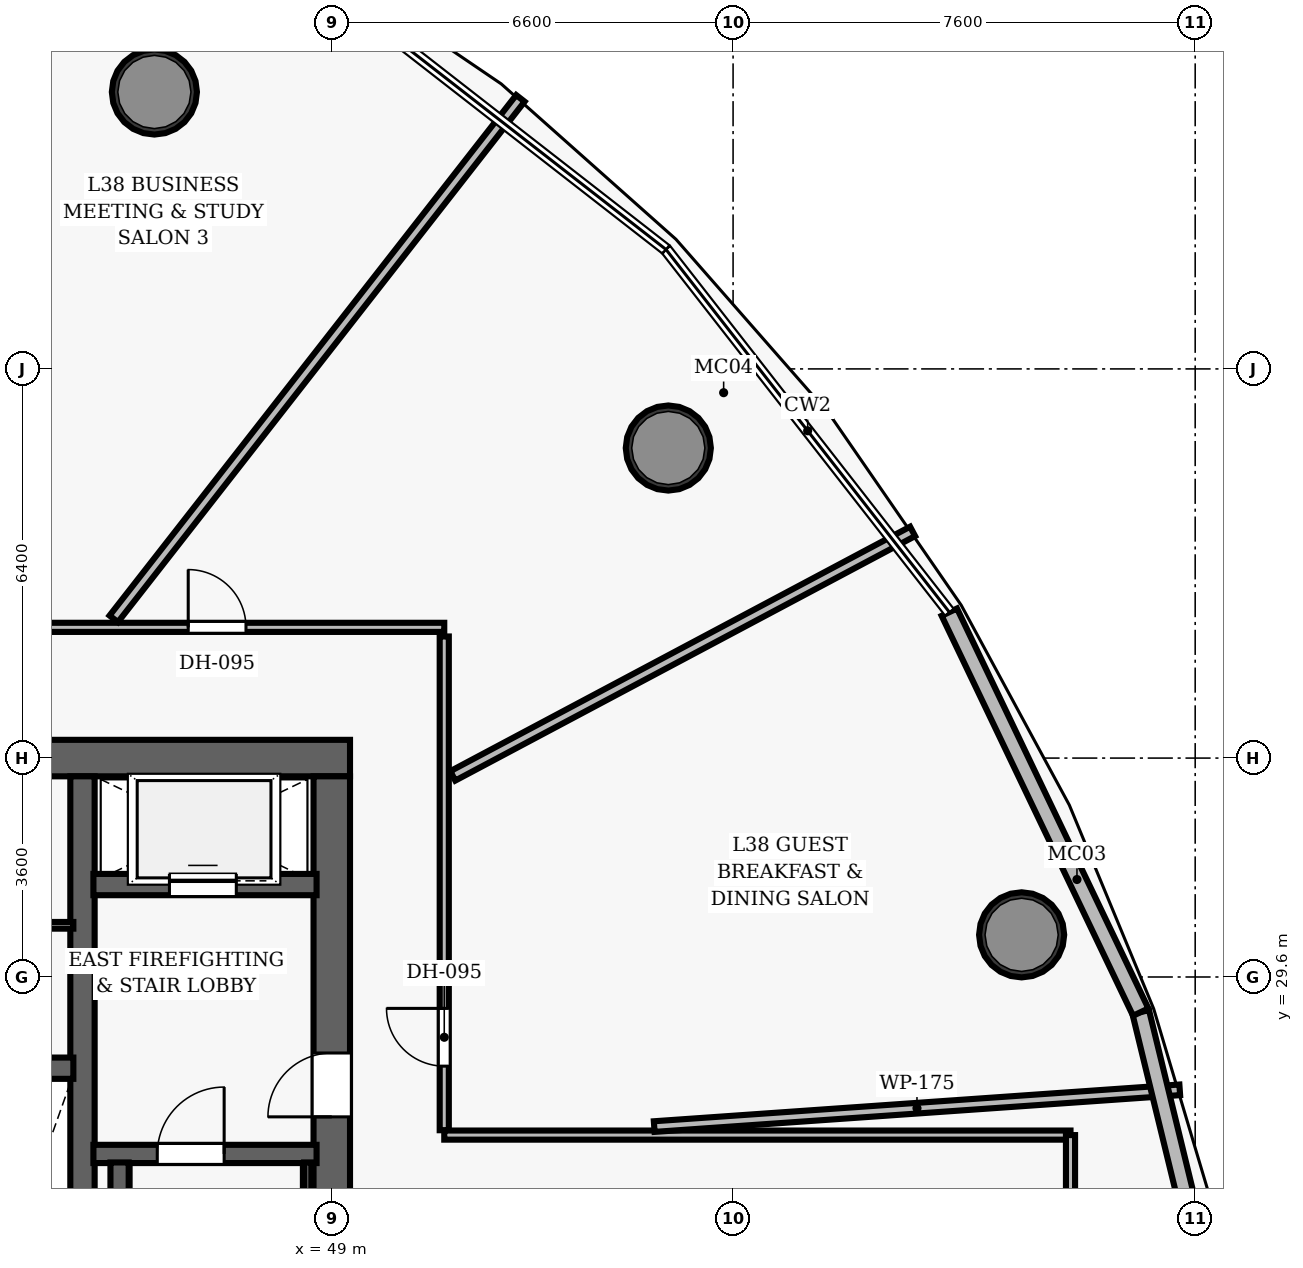
"""IFC4 building model, lengths in metres.
Left out: names, types, materials, properties, quantities, classifications, styles, units other than length and angle.
Written with IfcOpenShell. Run it as: python <this file> out.ifc"""

import sys

from ifc_helpers import new_model, si_unit, direction, frame, frame_2d, origin, origin_2d, place, context, subcontext, project, spatial, rectangle, hollow_circle, extrude, element, fill, save


model = new_model("IFC4")
c1 = context("Model", 3, precision=1e-05, world=origin(), true_north=direction((0.0, 1.0)))
c2 = subcontext(c1, "Body", "Model", "MODEL_VIEW")
j1 = project(units=[si_unit("LENGTHUNIT", "METRE"), si_unit("PLANEANGLEUNIT", "RADIAN")], contexts=[c1])
p1 = place(None, origin())
s1 = spatial("IfcSite", under=j1, at=p1, CompositionType="ELEMENT")
p2 = place(p1, origin())
s2 = spatial("IfcBuilding", under=s1, at=p2, CompositionType="ELEMENT")
p3 = place(p2, frame((0.0, 0.0, 151.8)))
s3 = spatial("IfcBuildingStorey", under=s2, at=p3, CompositionType="ELEMENT", Elevation=151.8)
p4 = place(p3, frame((26.7, 33.2, 0.0), z_axis=(0.0, 0.0, 1.0), x_axis=(1.0, 0.0, 0.0)))
e1 = element("IfcWall", 1, at=p4, inside=s3, PredefinedType="SHEAR", context=c2, shape_type="SweptSolid", body=[
    extrude(rectangle(XDim=22.6, YDim=0.6, at=frame_2d((11.3, 0.0))), origin(), (0.0, 0.0, 1.0), 3.5),
])
p5 = place(p4, frame((4.62, 0.0, 0.0)))
e2 = element("IfcOpeningElement", 2, at=p5, cuts=e1, PredefinedType="OPENING", context=c2, shape_type="SweptSolid", body=[
    extrude(rectangle(XDim=1.05, YDim=2.15, at=frame_2d((0.525, 1.075))), frame((0.0, 0.31, 0.0), z_axis=(0.0, -1.0, 0.0), x_axis=(1.0, 0.0, 0.0)), (0.0, 0.0, 1.0), 0.62),
])
p6 = place(p4, frame((14.52, 0.0, 0.0)))
e3 = element("IfcOpeningElement", 3, at=p6, cuts=e1, PredefinedType="OPENING", context=c2, shape_type="SweptSolid", body=[
    extrude(rectangle(XDim=1.05, YDim=2.15, at=frame_2d((0.525, 1.075))), frame((0.0, 0.31, 0.0), z_axis=(0.0, -1.0, 0.0), x_axis=(1.0, 0.0, 0.0)), (0.0, 0.0, 1.0), 0.62),
])
p7 = place(p3, frame((49.0, 19.1, 0.0), z_axis=(0.0, 0.0, 1.0), x_axis=(0.0, 1.0, 0.0)))
e4 = element("IfcWall", 4, at=p7, inside=s3, PredefinedType="SHEAR", context=c2, shape_type="SweptSolid", body=[
    extrude(rectangle(XDim=13.8, YDim=0.6, at=frame_2d((6.9, 0.0))), origin(), (0.0, 0.0, 1.0), 3.5),
])
p8 = place(p7, frame((8.2, 0.0, 0.0)))
e5 = element("IfcOpeningElement", 5, at=p8, cuts=e4, PredefinedType="OPENING", context=c2, shape_type="SweptSolid", body=[
    extrude(rectangle(XDim=1.05, YDim=2.15, at=frame_2d((0.525, 1.075))), frame((0.0, 0.31, 0.0), z_axis=(0.0, -1.0, 0.0), x_axis=(1.0, 0.0, 0.0)), (0.0, 0.0, 1.0), 0.62),
])
p9 = place(p3, frame((44.9, 19.1, 0.0), z_axis=(0.0, 0.0, 1.0), x_axis=(0.0, 1.0, 0.0)))
e6 = element("IfcWall", 6, at=p9, inside=s3, PredefinedType="SHEAR", context=c2, shape_type="SweptSolid", body=[
    extrude(rectangle(XDim=13.8, YDim=0.4, at=frame_2d((6.9, 0.0))), origin(), (0.0, 0.0, 1.0), 3.5),
])
for number, where, z_axis, x_axis in (
    (7, (60.346, 30.293, 0.0), (0.0, 0.0, 1.0), (1.0, 0.0, 0.0)),
    (8, (54.535, 38.299, 0.0), (0.0, 0.0, 1.0), (1.0, 0.0, 0.0)),
    (9, (46.083, 44.154, 0.0), (0.0, 0.0, 1.0), (1.0, 0.0, 0.0)),
):
    element("IfcColumn", number, at=place(p3, frame(where, z_axis=z_axis, x_axis=x_axis)), inside=s3, PredefinedType="COLUMN", context=c2, shape_type="SweptSolid", body=[
        extrude(hollow_circle(Radius=0.7, WallThickness=0.055, at=origin_2d()), origin(), (0.0, 0.0, 1.0), 3.5),
    ])
p10 = place(p3, frame((45.08, 26.69, 0.0), z_axis=(0.0, 0.0, 1.0), x_axis=(1.0, 0.0, 0.0)))
e10 = element("IfcWall", 10, at=p10, inside=s3, PredefinedType="SHEAR", context=c2, shape_type="SweptSolid", body=[
    extrude(rectangle(XDim=3.67, YDim=0.3, at=frame_2d((1.835, 0.0))), origin(), (0.0, 0.0, 1.0), 3.5),
])
p11 = place(p10, frame((1.05, 0.0, 0.0)))
e11 = element("IfcOpeningElement", 11, at=p11, cuts=e10, PredefinedType="OPENING", context=c2, shape_type="SweptSolid", body=[
    extrude(rectangle(XDim=1.1, YDim=2.15, at=frame_2d((0.55, 1.075))), frame((0.0, 0.16, 0.0), z_axis=(0.0, -1.0, 0.0), x_axis=(1.0, 0.0, 0.0)), (0.0, 0.0, 1.0), 0.32),
])
p12 = place(p3, frame((45.51, 19.05, 0.0), z_axis=(0.0, 0.0, 1.0), x_axis=(0.0, 1.0, 0.0)))
e12 = element("IfcWall", 12, at=p12, inside=s3, PredefinedType="SHEAR", context=c2, shape_type="SweptSolid", body=[
    extrude(rectangle(XDim=7.5, YDim=0.3, at=frame_2d((3.75, 0.0))), origin(), (0.0, 0.0, 1.0), 3.5),
])
p13 = place(p3, frame((48.605, 19.1, 0.0), z_axis=(0.0, 0.0, 1.0), x_axis=(0.0, 1.0, 0.0)))
e13 = element("IfcWall", 13, at=p13, inside=s3, PredefinedType="SHEAR", context=c2, shape_type="SweptSolid", body=[
    extrude(rectangle(XDim=7.45, YDim=0.12, at=frame_2d((3.725, 0.0))), origin(), (0.0, 0.0, 1.0), 3.5),
])
p14 = place(p3, frame((45.08, 31.12, 0.0), z_axis=(0.0, 0.0, 1.0), x_axis=(1.0, 0.0, 0.0)))
e14 = element("IfcWall", 14, at=p14, inside=s3, PredefinedType="SHEAR", context=c2, shape_type="SweptSolid", body=[
    extrude(rectangle(XDim=3.67, YDim=0.35, at=frame_2d((1.835, 0.0))), origin(), (0.0, 0.0, 1.0), 2.675),
])
p15 = place(p14, frame((1.25, 0.0, 0.0)))
e15 = element("IfcOpeningElement", 15, at=p15, cuts=e14, PredefinedType="OPENING", context=c2, shape_type="SweptSolid", body=[
    extrude(rectangle(XDim=1.1, YDim=2.15, at=frame_2d((0.55, 1.075))), frame((0.0, 0.185, 0.0), z_axis=(0.0, -1.0, 0.0), x_axis=(1.0, 0.0, 0.0)), (0.0, 0.0, 1.0), 0.37),
])
p16 = place(p3, frame((42.72, 28.1, 0.0), z_axis=(0.0, 0.0, 1.0), x_axis=(1.0, 0.0, 0.0)))
e16 = element("IfcWall", 16, at=p16, inside=s3, PredefinedType="SHEAR", context=c2, shape_type="SweptSolid", body=[
    extrude(rectangle(XDim=2.03, YDim=0.35, at=frame_2d((1.015, 0.0))), origin(), (0.0, 0.0, 1.0), 2.675),
])
p17 = place(p3, frame((42.55, 30.45, 0.0), z_axis=(0.0, 0.0, 1.0), x_axis=(1.0, 0.0, 0.0)))
e17 = element("IfcWall", 17, at=p17, inside=s3, PredefinedType="PARTITIONING", context=c2, shape_type="SweptSolid", body=[
    extrude(rectangle(XDim=2.2, YDim=0.11, at=frame_2d((1.1, 0.0))), origin(), (0.0, 0.0, 1.0), 2.675),
])
p18 = place(p3, frame((24.85, 35.35, 0.0), z_axis=(0.0, 0.0, 1.0), x_axis=(1.0, 0.0, 0.0)))
e18 = element("IfcWall", 18, at=p18, inside=s3, PredefinedType="PARTITIONING", context=c2, shape_type="SweptSolid", body=[
    extrude(rectangle(XDim=26.0, YDim=0.15, at=frame_2d((13.0, 0.0))), origin(), (0.0, 0.0, 1.0), 2.675),
])
p19 = place(p18, frame((21.789, 0.0, 0.0)))
e19 = element("IfcOpeningElement", 19, at=p19, cuts=e18, PredefinedType="OPENING", context=c2, shape_type="SweptSolid", body=[
    extrude(rectangle(XDim=0.95, YDim=2.15, at=frame_2d((0.475, 1.075))), frame((0.0, 0.085, 0.0), z_axis=(0.0, -1.0, 0.0), x_axis=(1.0, 0.0, 0.0)), (0.0, 0.0, 1.0), 0.17),
])
p20 = place(p18, frame((16.151, 0.0, 0.0)))
e20 = element("IfcOpeningElement", 20, at=p20, cuts=e18, PredefinedType="OPENING", context=c2, shape_type="SweptSolid", body=[
    extrude(rectangle(XDim=0.95, YDim=2.15, at=frame_2d((0.475, 1.075))), frame((0.0, 0.085, 0.0), z_axis=(0.0, -1.0, 0.0), x_axis=(1.0, 0.0, 0.0)), (0.0, 0.0, 1.0), 0.17),
])
p21 = place(p18, frame((13.021, 0.0, 0.0)))
e21 = element("IfcOpeningElement", 21, at=p21, cuts=e18, PredefinedType="OPENING", context=c2, shape_type="SweptSolid", body=[
    extrude(rectangle(XDim=0.95, YDim=2.15, at=frame_2d((0.475, 1.075))), frame((0.0, 0.085, 0.0), z_axis=(0.0, -1.0, 0.0), x_axis=(1.0, 0.0, 0.0)), (0.0, 0.0, 1.0), 0.17),
])
p22 = place(p18, frame((9.972, 0.0, 0.0)))
e22 = element("IfcOpeningElement", 22, at=p22, cuts=e18, PredefinedType="OPENING", context=c2, shape_type="SweptSolid", body=[
    extrude(rectangle(XDim=0.95, YDim=2.15, at=frame_2d((0.475, 1.075))), frame((0.0, 0.085, 0.0), z_axis=(0.0, -1.0, 0.0), x_axis=(1.0, 0.0, 0.0)), (0.0, 0.0, 1.0), 0.17),
])
p23 = place(p18, frame((4.819, 0.0, 0.0)))
e23 = element("IfcOpeningElement", 23, at=p23, cuts=e18, PredefinedType="OPENING", context=c2, shape_type="SweptSolid", body=[
    extrude(rectangle(XDim=0.95, YDim=2.15, at=frame_2d((0.475, 1.075))), frame((0.0, 0.085, 0.0), z_axis=(0.0, -1.0, 0.0), x_axis=(1.0, 0.0, 0.0)), (0.0, 0.0, 1.0), 0.17),
])
p24 = place(p3, frame((50.85, 27.08, 0.0), z_axis=(0.0, 0.0, 1.0), x_axis=(0.0, 1.0, 0.0)))
e24 = element("IfcWall", 24, at=p24, inside=s3, PredefinedType="PARTITIONING", context=c2, shape_type="SweptSolid", body=[
    extrude(rectangle(XDim=8.12, YDim=0.15, at=frame_2d((4.06, 0.0))), origin(), (0.0, 0.0, 1.0), 2.675),
])
p25 = place(p24, frame((1.054, 0.0, 0.0)))
e25 = element("IfcOpeningElement", 25, at=p25, cuts=e24, PredefinedType="OPENING", context=c2, shape_type="SweptSolid", body=[
    extrude(rectangle(XDim=0.95, YDim=2.15, at=frame_2d((0.475, 1.075))), frame((0.0, 0.085, 0.0), z_axis=(0.0, -1.0, 0.0), x_axis=(1.0, 0.0, 0.0)), (0.0, 0.0, 1.0), 0.17),
])
p26 = place(p3, frame((50.85, 27.0, 0.0), z_axis=(0.0, 0.0, 1.0), x_axis=(1.0, 0.0, 0.0)))
e26 = element("IfcWall", 26, at=p26, inside=s3, PredefinedType="PARTITIONING", context=c2, shape_type="SweptSolid", body=[
    extrude(rectangle(XDim=10.299, YDim=0.15, at=frame_2d((5.15, 0.0))), origin(), (0.0, 0.0, 1.0), 2.675),
])
p27 = place(p3, frame((61.149, 25.0, 0.0), z_axis=(0.0, 0.0, 1.0), x_axis=(0.0, 1.0, 0.0)))
e27 = element("IfcWall", 27, at=p27, inside=s3, PredefinedType="PARTITIONING", context=c2, shape_type="SweptSolid", body=[
    extrude(rectangle(XDim=2.0, YDim=0.15, at=frame_2d((1.0, 0.0))), origin(), (0.0, 0.0, 1.0), 2.675),
])
p28 = place(p3, frame((54.303, 27.14, 0.0), z_axis=(0.0, 0.0, 1.0), x_axis=(0.997563440147, 0.069765198221, 0.0)))
e28 = element("IfcWall", 28, at=p28, inside=s3, PredefinedType="PARTITIONING", context=c2, shape_type="SweptSolid", body=[
    extrude(rectangle(XDim=8.665, YDim=0.175, at=frame_2d((4.332, 0.0))), origin(), (0.0, 0.0, 1.0), 2.675),
])
p29 = place(p3, frame((50.99, 32.907, 0.0), z_axis=(0.0, 0.0, 1.0), x_axis=(0.88295032644, 0.469466421632, 0.0)))
e29 = element("IfcWall", 29, at=p29, inside=s3, PredefinedType="PARTITIONING", context=c2, shape_type="SweptSolid", body=[
    extrude(rectangle(XDim=8.565, YDim=0.175, at=frame_2d((4.282, 0.0))), origin(), (0.0, 0.0, 1.0), 2.675),
])
p30 = place(p3, frame((45.414, 35.49, 0.0), z_axis=(0.0, 0.0, 1.0), x_axis=(0.615680241207, 0.787996091734, 0.0)))
e30 = element("IfcWall", 30, at=p30, inside=s3, PredefinedType="PARTITIONING", context=c2, shape_type="SweptSolid", body=[
    extrude(rectangle(XDim=10.863, YDim=0.175, at=frame_2d((5.431, 0.0))), origin(), (0.0, 0.0, 1.0), 2.675),
])
p31 = place(p3, frame((62.304, 29.022, 0.0), z_axis=(0.0, 0.0, 1.0), x_axis=(0.236627302203, -0.971600493954, 0.0)))
e31 = element("IfcWall", 31, at=p31, inside=s3, PredefinedType="SOLIDWALL", context=c2, shape_type="SweptSolid", body=[
    extrude(rectangle(XDim=6.665, YDim=0.28, at=frame_2d((3.333, 0.0))), origin(), (0.0, 0.0, 1.0), 3.26),
])
p32 = place(p3, frame((59.156, 35.6, 0.0), z_axis=(0.0, 0.0, 1.0), x_axis=(0.431705455872, -0.902014633679, 0.0)))
e32 = element("IfcWall", 32, at=p32, inside=s3, PredefinedType="SOLIDWALL", context=c2, shape_type="SweptSolid", body=[
    extrude(rectangle(XDim=7.292, YDim=0.28, at=frame_2d((3.646, 0.0))), origin(), (0.0, 0.0, 1.0), 3.26),
])
p33 = place(p11, origin())
e33 = element("IfcDoor", 33, at=p33, inside=s3, OperationType="SINGLE_SWING_RIGHT", PredefinedType="DOOR", context=c2, shape_type="SweptSolid", body=[
    extrude(rectangle(XDim=1.1, YDim=2.15, at=frame_2d((0.55, 1.075))), frame((0.0, 0.025, 0.0), z_axis=(0.0, -1.0, 0.0), x_axis=(1.0, 0.0, 0.0)), (0.0, 0.0, 1.0), 0.05),
])
fill(e11, e33)
p34 = place(p8, origin())
e34 = element("IfcDoor", 34, at=p34, inside=s3, OperationType="SINGLE_SWING_LEFT", PredefinedType="DOOR", context=c2, shape_type="SweptSolid", body=[
    extrude(rectangle(XDim=1.05, YDim=2.15, at=frame_2d((0.525, 1.075))), frame((0.0, 0.025, 0.0), z_axis=(0.0, -1.0, 0.0), x_axis=(1.0, 0.0, 0.0)), (0.0, 0.0, 1.0), 0.05),
])
fill(e5, e34)
p35 = place(p25, origin())
e35 = element("IfcDoor", 35, at=p35, inside=s3, OperationType="SINGLE_SWING_RIGHT", PredefinedType="DOOR", context=c2, shape_type="SweptSolid", body=[
    extrude(rectangle(XDim=0.95, YDim=2.15, at=frame_2d((0.475, 1.075))), frame((0.0, 0.025, 0.0), z_axis=(0.0, -1.0, 0.0), x_axis=(1.0, 0.0, 0.0)), (0.0, 0.0, 1.0), 0.05),
])
fill(e25, e35)
p36 = place(p19, origin())
e36 = element("IfcDoor", 36, at=p36, inside=s3, OperationType="SINGLE_SWING_LEFT", PredefinedType="DOOR", context=c2, shape_type="SweptSolid", body=[
    extrude(rectangle(XDim=0.95, YDim=2.15, at=frame_2d((0.475, 1.075))), frame((0.0, 0.025, 0.0), z_axis=(0.0, -1.0, 0.0), x_axis=(1.0, 0.0, 0.0)), (0.0, 0.0, 1.0), 0.05),
])
fill(e19, e36)
p37 = place(p15, origin())
e37 = element("IfcDoor", 37, at=p37, inside=s3, OperationType="SLIDING_TO_LEFT", PredefinedType="DOOR", context=c2, shape_type="SweptSolid", body=[
    extrude(rectangle(XDim=1.1, YDim=2.15, at=frame_2d((0.55, 1.075))), frame((0.0, 0.025, 0.0), z_axis=(0.0, -1.0, 0.0), x_axis=(1.0, 0.0, 0.0)), (0.0, 0.0, 1.0), 0.05),
])
fill(e15, e37)
save(model, sys.argv[1])
